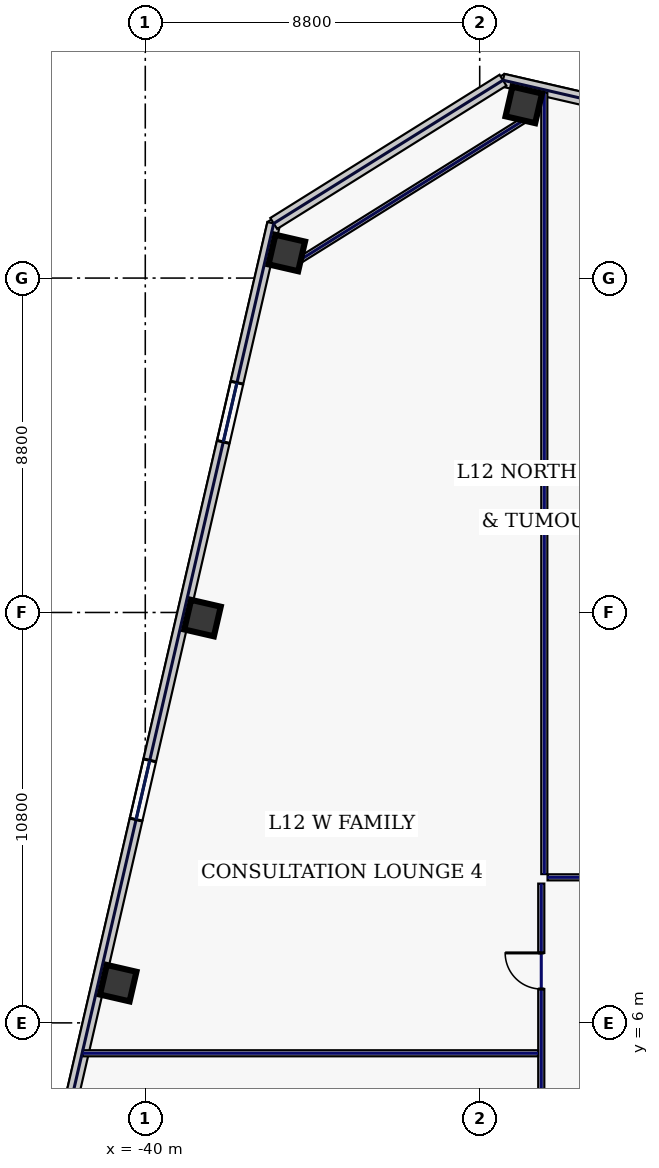
"""IFC4 building model, lengths in metres.
Left out: names, types, materials, properties, quantities, classifications, styles, units other than length and angle.
Written with IfcOpenShell. Run it as: python <this file> out.ifc"""

import sys

from ifc_helpers import new_model, si_unit, direction, frame, frame_2d, origin, origin_2d, place, context, subcontext, project, spatial, rectangle, hollow_rectangle, extrude, element, fill, save


model = new_model("IFC4")
c1 = context("Model", 3, precision=1e-05, world=origin(), true_north=direction((0.0, 1.0)))
c2 = subcontext(c1, "Body", "Model", "MODEL_VIEW")
j1 = project(units=[si_unit("LENGTHUNIT", "METRE"), si_unit("PLANEANGLEUNIT", "RADIAN")], contexts=[c1])
p1 = place(None, origin())
s1 = spatial("IfcSite", under=j1, at=p1, CompositionType="ELEMENT")
p2 = place(p1, origin())
s2 = spatial("IfcBuilding", under=s1, at=p2, CompositionType="ELEMENT")
p3 = place(p2, frame((0.0, 0.0, 59.4)))
s3 = spatial("IfcBuildingStorey", under=s2, at=p3, CompositionType="ELEMENT", Elevation=59.4)
for number, where, z_axis, x_axis in (
    (1, (-30.04, 30.156, 0.0), (0.0, 0.0, 1.0), (0.974, -0.225, 0.0)),
    (2, (-36.276, 26.26, 0.0), (0.0, 0.0, 1.0), (0.974, -0.225, 0.0)),
    (3, (-38.494, 16.652, 0.0), (0.0, 0.0, 1.0), (0.974, -0.225, 0.0)),
    (4, (-40.712, 7.045, 0.0), (0.0, 0.0, 1.0), (0.974, -0.225, 0.0)),
):
    element("IfcColumn", number, at=place(p3, frame(where, z_axis=z_axis, x_axis=x_axis)), inside=s3, PredefinedType="COLUMN", context=c2, shape_type="SweptSolid", body=[
        extrude(hollow_rectangle(XDim=0.8, YDim=0.8, WallThickness=0.036, at=origin_2d()), origin(), (0.0, 0.0, 1.0), 3.74),
    ])
p4 = place(p3, frame((-8.517, 25.711, 0.0), z_axis=(0.0, 0.0, 1.0), x_axis=(-0.974372845456, 0.224939009598, 0.0)))
e5 = element("IfcWall", 5, at=p4, inside=s3, PredefinedType="STANDARD", context=c2, shape_type="SweptSolid", body=[
    extrude(rectangle(XDim=22.652, YDim=0.34, at=frame_2d((11.326, 0.0))), origin(), (0.0, 0.0, 1.0), 3.74),
])
p5 = place(p4, frame((18.539, 0.0, 0.22)))
e6 = element("IfcOpeningElement", 6, at=p5, cuts=e5, PredefinedType="OPENING", context=c2, shape_type="SweptSolid", body=[
    extrude(rectangle(XDim=1.6, YDim=1.2, at=frame_2d((0.8, 0.6))), frame((0.0, 0.18, 0.0), z_axis=(0.0, -1.0, 0.0), x_axis=(1.0, 0.0, 0.0)), (0.0, 0.0, 1.0), 0.36),
])
p6 = place(p4, frame((14.055, 0.0, 0.22)))
e7 = element("IfcOpeningElement", 7, at=p6, cuts=e5, PredefinedType="OPENING", context=c2, shape_type="SweptSolid", body=[
    extrude(rectangle(XDim=1.6, YDim=1.2, at=frame_2d((0.8, 0.6))), frame((0.0, 0.18, 0.0), z_axis=(0.0, -1.0, 0.0), x_axis=(1.0, 0.0, 0.0)), (0.0, 0.0, 1.0), 0.36),
])
p7 = place(p4, frame((4.306, 0.0, 0.22)))
e8 = element("IfcOpeningElement", 8, at=p7, cuts=e5, PredefinedType="OPENING", context=c2, shape_type="SweptSolid", body=[
    extrude(rectangle(XDim=1.6, YDim=1.2, at=frame_2d((0.8, 0.6))), frame((0.0, 0.18, 0.0), z_axis=(0.0, -1.0, 0.0), x_axis=(1.0, 0.0, 0.0)), (0.0, 0.0, 1.0), 0.36),
])
p8 = place(p3, frame((-36.62, 27.037, 0.0), z_axis=(0.0, 0.0, 1.0), x_axis=(-0.224951280646, -0.974370012539, 0.0)))
e9 = element("IfcWall", 9, at=p8, inside=s3, PredefinedType="STANDARD", context=c2, shape_type="SweptSolid", body=[
    extrude(rectangle(XDim=40.8, YDim=0.34, at=frame_2d((20.4, 0.0))), origin(), (0.0, 0.0, 1.0), 3.74),
])
p9 = place(p8, frame((4.3, 0.0, 0.22)))
e10 = element("IfcOpeningElement", 10, at=p9, cuts=e9, PredefinedType="OPENING", context=c2, shape_type="SweptSolid", body=[
    extrude(rectangle(XDim=1.6, YDim=1.2, at=frame_2d((0.8, 0.6))), frame((0.0, 0.18, 0.0), z_axis=(0.0, -1.0, 0.0), x_axis=(1.0, 0.0, 0.0)), (0.0, 0.0, 1.0), 0.36),
])
p10 = place(p8, frame((14.5, 0.0, 0.22)))
e11 = element("IfcOpeningElement", 11, at=p10, cuts=e9, PredefinedType="OPENING", context=c2, shape_type="SweptSolid", body=[
    extrude(rectangle(XDim=1.6, YDim=1.2, at=frame_2d((0.8, 0.6))), frame((0.0, 0.18, 0.0), z_axis=(0.0, -1.0, 0.0), x_axis=(1.0, 0.0, 0.0)), (0.0, 0.0, 1.0), 0.36),
])
p11 = place(p8, frame((24.7, 0.0, 0.22)))
e12 = element("IfcOpeningElement", 12, at=p11, cuts=e9, PredefinedType="OPENING", context=c2, shape_type="SweptSolid", body=[
    extrude(rectangle(XDim=1.6, YDim=1.2, at=frame_2d((0.8, 0.6))), frame((0.0, 0.18, 0.0), z_axis=(0.0, -1.0, 0.0), x_axis=(1.0, 0.0, 0.0)), (0.0, 0.0, 1.0), 0.36),
])
p12 = place(p8, frame((34.9, 0.0, 0.22)))
e13 = element("IfcOpeningElement", 13, at=p12, cuts=e9, PredefinedType="OPENING", context=c2, shape_type="SweptSolid", body=[
    extrude(rectangle(XDim=1.6, YDim=1.2, at=frame_2d((0.8, 0.6))), frame((0.0, 0.18, 0.0), z_axis=(0.0, -1.0, 0.0), x_axis=(1.0, 0.0, 0.0)), (0.0, 0.0, 1.0), 0.36),
])
p13 = place(p3, frame((-30.588, 30.807, 0.0), z_axis=(0.0, 0.0, 1.0), x_axis=(-0.848031080615, -0.529946493819, 0.0)))
e14 = element("IfcWall", 14, at=p13, inside=s3, PredefinedType="STANDARD", context=c2, shape_type="SweptSolid", body=[
    extrude(rectangle(XDim=7.114, YDim=0.34, at=frame_2d((3.557, 0.0))), origin(), (0.0, 0.0, 1.0), 3.74),
])
p14 = place(p3, frame((-29.86, 29.868, 0.0), z_axis=(0.0, 0.0, 1.0), x_axis=(-0.848043064089, -0.529927317139, 0.0)))
e15 = element("IfcWall", 15, at=p14, inside=s3, PredefinedType="PARTITIONING", context=c2, shape_type="SweptSolid", body=[
    extrude(rectangle(XDim=7.354, YDim=0.16, at=frame_2d((3.677, 0.0))), origin(), (0.0, 0.0, 1.0), 1.535),
])
p15 = place(p3, frame((-29.58, -9.615, 0.0), z_axis=(0.0, 0.0, 1.0), x_axis=(0.0, 1.0, 0.0)))
e16 = element("IfcWall", 16, at=p15, inside=s3, PredefinedType="PARTITIONING", context=c2, shape_type="SweptSolid", body=[
    extrude(rectangle(XDim=19.28, YDim=0.16, at=frame_2d((9.64, 0.0))), origin(), (0.0, 0.0, 1.0), 3.74),
])
p16 = place(p15, frame((1.969, 0.0, 0.0)))
e17 = element("IfcOpeningElement", 17, at=p16, cuts=e16, PredefinedType="OPENING", context=c2, shape_type="SweptSolid", body=[
    extrude(rectangle(XDim=0.95, YDim=2.2, at=frame_2d((0.475, 1.1))), frame((0.0, 0.09, 0.0), z_axis=(0.0, -1.0, 0.0), x_axis=(1.0, 0.0, 0.0)), (0.0, 0.0, 1.0), 0.18),
])
p17 = place(p15, frame((6.625, 0.0, 0.0)))
e18 = element("IfcOpeningElement", 18, at=p17, cuts=e16, PredefinedType="OPENING", context=c2, shape_type="SweptSolid", body=[
    extrude(rectangle(XDim=0.95, YDim=2.2, at=frame_2d((0.475, 1.1))), frame((0.0, 0.09, 0.0), z_axis=(0.0, -1.0, 0.0), x_axis=(1.0, 0.0, 0.0)), (0.0, 0.0, 1.0), 0.18),
])
p18 = place(p15, frame((11.825, 0.0, 0.0)))
e19 = element("IfcOpeningElement", 19, at=p18, cuts=e16, PredefinedType="OPENING", context=c2, shape_type="SweptSolid", body=[
    extrude(rectangle(XDim=0.95, YDim=2.2, at=frame_2d((0.475, 1.1))), frame((0.0, 0.09, 0.0), z_axis=(0.0, -1.0, 0.0), x_axis=(1.0, 0.0, 0.0)), (0.0, 0.0, 1.0), 0.18),
])
p19 = place(p15, frame((16.506, 0.0, 0.0)))
e20 = element("IfcOpeningElement", 20, at=p19, cuts=e16, PredefinedType="OPENING", context=c2, shape_type="SweptSolid", body=[
    extrude(rectangle(XDim=0.95, YDim=2.2, at=frame_2d((0.475, 1.1))), frame((0.0, 0.09, 0.0), z_axis=(0.0, -1.0, 0.0), x_axis=(1.0, 0.0, 0.0)), (0.0, 0.0, 1.0), 0.18),
])
p20 = place(p3, frame((-29.415, 9.83, 0.0), z_axis=(0.0, 0.0, 1.0), x_axis=(1.0, 0.0, 0.0)))
e21 = element("IfcWall", 21, at=p20, inside=s3, PredefinedType="PARTITIONING", context=c2, shape_type="SweptSolid", body=[
    extrude(rectangle(XDim=58.83, YDim=0.16, at=frame_2d((29.415, 0.0))), origin(), (0.0, 0.0, 1.0), 3.74),
])
p21 = place(p20, frame((2.044, 0.0, 0.0)))
e22 = element("IfcOpeningElement", 22, at=p21, cuts=e21, PredefinedType="OPENING", context=c2, shape_type="SweptSolid", body=[
    extrude(rectangle(XDim=1.05, YDim=2.2, at=frame_2d((0.525, 1.1))), frame((0.0, 0.09, 0.0), z_axis=(0.0, -1.0, 0.0), x_axis=(1.0, 0.0, 0.0)), (0.0, 0.0, 1.0), 0.18),
])
p22 = place(p20, frame((7.663, 0.0, 0.0)))
e23 = element("IfcOpeningElement", 23, at=p22, cuts=e21, PredefinedType="OPENING", context=c2, shape_type="SweptSolid", body=[
    extrude(rectangle(XDim=0.95, YDim=2.2, at=frame_2d((0.475, 1.1))), frame((0.0, 0.09, 0.0), z_axis=(0.0, -1.0, 0.0), x_axis=(1.0, 0.0, 0.0)), (0.0, 0.0, 1.0), 0.18),
])
p23 = place(p20, frame((14.188, 0.0, 0.0)))
e24 = element("IfcOpeningElement", 24, at=p23, cuts=e21, PredefinedType="OPENING", context=c2, shape_type="SweptSolid", body=[
    extrude(rectangle(XDim=0.95, YDim=2.2, at=frame_2d((0.475, 1.1))), frame((0.0, 0.09, 0.0), z_axis=(0.0, -1.0, 0.0), x_axis=(1.0, 0.0, 0.0)), (0.0, 0.0, 1.0), 0.18),
])
p24 = place(p20, frame((22.025, 0.0, 0.0)))
e25 = element("IfcOpeningElement", 25, at=p24, cuts=e21, PredefinedType="OPENING", context=c2, shape_type="SweptSolid", body=[
    extrude(rectangle(XDim=1.15, YDim=2.2, at=frame_2d((0.575, 1.1))), frame((0.0, 0.09, 0.0), z_axis=(0.0, -1.0, 0.0), x_axis=(1.0, 0.0, 0.0)), (0.0, 0.0, 1.0), 0.18),
])
p25 = place(p20, frame((32.225, 0.0, 0.0)))
e26 = element("IfcOpeningElement", 26, at=p25, cuts=e21, PredefinedType="OPENING", context=c2, shape_type="SweptSolid", body=[
    extrude(rectangle(XDim=0.95, YDim=2.2, at=frame_2d((0.475, 1.1))), frame((0.0, 0.09, 0.0), z_axis=(0.0, -1.0, 0.0), x_axis=(1.0, 0.0, 0.0)), (0.0, 0.0, 1.0), 0.18),
])
p26 = place(p20, frame((42.925, 0.0, 0.0)))
e27 = element("IfcOpeningElement", 27, at=p26, cuts=e21, PredefinedType="OPENING", context=c2, shape_type="SweptSolid", body=[
    extrude(rectangle(XDim=1.05, YDim=2.2, at=frame_2d((0.525, 1.1))), frame((0.0, 0.09, 0.0), z_axis=(0.0, -1.0, 0.0), x_axis=(1.0, 0.0, 0.0)), (0.0, 0.0, 1.0), 0.18),
])
p27 = place(p20, frame((51.65, 0.0, 0.0)))
e28 = element("IfcOpeningElement", 28, at=p27, cuts=e21, PredefinedType="OPENING", context=c2, shape_type="SweptSolid", body=[
    extrude(rectangle(XDim=0.95, YDim=2.2, at=frame_2d((0.475, 1.1))), frame((0.0, 0.09, 0.0), z_axis=(0.0, -1.0, 0.0), x_axis=(1.0, 0.0, 0.0)), (0.0, 0.0, 1.0), 0.18),
])
p28 = place(p20, frame((56.006, 0.0, 0.0)))
e29 = element("IfcOpeningElement", 29, at=p28, cuts=e21, PredefinedType="OPENING", context=c2, shape_type="SweptSolid", body=[
    extrude(rectangle(XDim=0.95, YDim=2.2, at=frame_2d((0.475, 1.1))), frame((0.0, 0.09, 0.0), z_axis=(0.0, -1.0, 0.0), x_axis=(1.0, 0.0, 0.0)), (0.0, 0.0, 1.0), 0.18),
])
p29 = place(p3, frame((-29.5, 9.915, 0.0), z_axis=(0.0, 0.0, 1.0), x_axis=(0.0, 1.0, 0.0)))
e30 = element("IfcWall", 30, at=p29, inside=s3, PredefinedType="PARTITIONING", context=c2, shape_type="SweptSolid", body=[
    extrude(rectangle(XDim=20.569, YDim=0.16, at=frame_2d((10.284, 0.0))), origin(), (0.0, 0.0, 1.0), 3.74),
])
p30 = place(p3, frame((-41.641, 5.2, 0.0), z_axis=(0.0, 0.0, 1.0), x_axis=(1.0, 0.0, 0.0)))
e31 = element("IfcWall", 31, at=p30, inside=s3, PredefinedType="PARTITIONING", context=c2, shape_type="SweptSolid", body=[
    extrude(rectangle(XDim=11.976, YDim=0.16, at=frame_2d((5.988, 0.0))), origin(), (0.0, 0.0, 1.0), 3.74),
])
p31 = place(p9, origin())
e32 = element("IfcWindow", 32, at=p31, inside=s3, PartitioningType="SINGLE_PANEL", PredefinedType="WINDOW", context=c2, shape_type="SweptSolid", body=[
    extrude(rectangle(XDim=1.6, YDim=1.2, at=frame_2d((0.8, 0.6))), frame((0.0, 0.03, 0.0), z_axis=(0.0, -1.0, 0.0), x_axis=(1.0, 0.0, 0.0)), (0.0, 0.0, 1.0), 0.06),
])
fill(e10, e32)
p32 = place(p10, origin())
e33 = element("IfcWindow", 33, at=p32, inside=s3, PartitioningType="SINGLE_PANEL", PredefinedType="WINDOW", context=c2, shape_type="SweptSolid", body=[
    extrude(rectangle(XDim=1.6, YDim=1.2, at=frame_2d((0.8, 0.6))), frame((0.0, 0.03, 0.0), z_axis=(0.0, -1.0, 0.0), x_axis=(1.0, 0.0, 0.0)), (0.0, 0.0, 1.0), 0.06),
])
fill(e11, e33)
p33 = place(p19, origin())
e34 = element("IfcDoor", 34, at=p33, inside=s3, OperationType="SINGLE_SWING_RIGHT", PredefinedType="DOOR", context=c2, shape_type="SweptSolid", body=[
    extrude(rectangle(XDim=0.95, YDim=2.2, at=frame_2d((0.475, 1.1))), frame((0.0, 0.025, 0.0), z_axis=(0.0, -1.0, 0.0), x_axis=(1.0, 0.0, 0.0)), (0.0, 0.0, 1.0), 0.05),
])
fill(e20, e34)
save(model, sys.argv[1])
